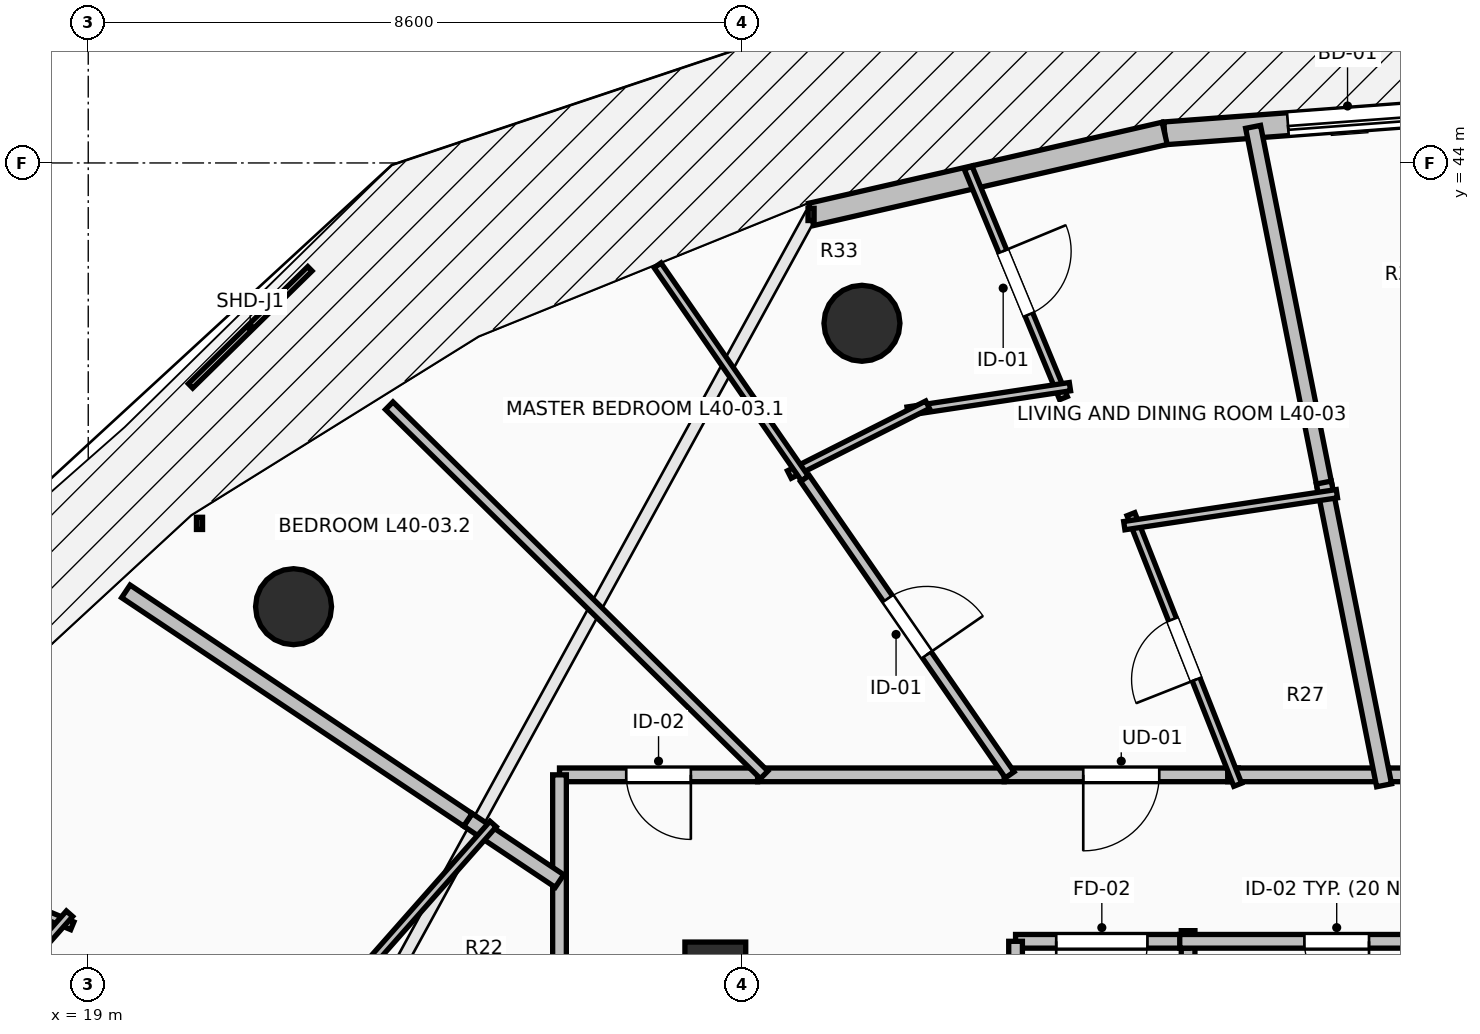
"""IFC4 building model, lengths in metres.
Left out: names, types, materials, properties, quantities, classifications, styles, units other than length and angle.
Written with IfcOpenShell. Run it as: python <this file> out.ifc"""

import sys

from ifc_helpers import new_model, si_unit, direction, frame, frame_2d, origin, origin_2d, place, context, subcontext, project, spatial, rectangle, circle, extrude, element, fill, save


model = new_model("IFC4")
c1 = context("Model", 3, precision=1e-05, world=origin(), true_north=direction((0.0, 1.0)))
c2 = subcontext(c1, "Body", "Model", "MODEL_VIEW")
j1 = project(units=[si_unit("LENGTHUNIT", "METRE"), si_unit("PLANEANGLEUNIT", "RADIAN")], contexts=[c1])
p1 = place(None, origin())
s1 = spatial("IfcSite", under=j1, at=p1, CompositionType="ELEMENT")
p2 = place(p1, origin())
s2 = spatial("IfcBuilding", under=s1, at=p2, CompositionType="ELEMENT")
p3 = place(p2, frame((0.0, 0.0, 150.1)))
s3 = spatial("IfcBuildingStorey", under=s2, at=p3, CompositionType="ELEMENT", Elevation=150.1)
for number, where, z_axis, x_axis in (
    (1, (29.179, 41.891, 0.0), (0.0, 0.0, 1.0), (-0.383, 0.924, 0.0)),
    (2, (21.701, 38.162, 0.0), (0.0, 0.0, 1.0), (-0.707, 0.707, 0.0)),
):
    element("IfcColumn", number, at=place(p3, frame(where, z_axis=z_axis, x_axis=x_axis)), inside=s3, PredefinedType="COLUMN", context=c2, shape_type="SweptSolid", body=[
        extrude(circle(Radius=0.5, at=origin_2d()), origin(), (0.0, 0.0, 1.0), 3.5),
    ])
p4 = place(p3, frame((27.25, 33.15, 0.0), z_axis=(0.0, 0.0, 1.0), x_axis=(1.0, 0.0, 0.0)))
e3 = element("IfcColumn", 3, at=p4, inside=s3, PredefinedType="PILASTER", context=c2, shape_type="SweptSolid", body=[
    extrude(rectangle(XDim=0.8, YDim=1.2, at=origin_2d()), origin(), (0.0, 0.0, 1.0), 3.5),
])
p5 = place(p3, frame((38.0, 44.75, 0.0), z_axis=(0.0, 0.0, 1.0), x_axis=(-0.997237740067, -0.074275768499, 0.0)))
e4 = element("IfcWall", 4, at=p5, inside=s3, PredefinedType="STANDARD", context=c2, shape_type="SweptSolid", body=[
    extrude(rectangle(XDim=4.852, YDim=0.3, at=frame_2d((2.426, 0.0))), origin(), (0.0, 0.0, 1.0), 3.24),
])
p6 = place(p5, frame((1.626, 0.0, 0.0)))
e5 = element("IfcOpeningElement", 5, at=p6, cuts=e4, PredefinedType="OPENING", context=c2, shape_type="SweptSolid", body=[
    extrude(rectangle(XDim=1.6, YDim=2.3, at=frame_2d((0.8, 1.15))), frame((0.0, 0.165, 0.0), z_axis=(0.0, -1.0, 0.0), x_axis=(1.0, 0.0, 0.0)), (0.0, 0.0, 1.0), 0.33),
])
p7 = place(p3, frame((33.162, 44.39, 0.0), z_axis=(0.0, 0.0, 1.0), x_axis=(-0.974698897188, -0.223521944832, 0.0)))
e6 = element("IfcWall", 6, at=p7, inside=s3, PredefinedType="STANDARD", context=c2, shape_type="SweptSolid", body=[
    extrude(rectangle(XDim=4.773, YDim=0.3, at=frame_2d((2.387, 0.0))), origin(), (0.0, 0.0, 1.0), 3.24),
])
p8 = place(p3, frame((33.47, 30.34, 0.0), z_axis=(0.0, 0.0, 1.0), x_axis=(0.0, 1.0, 0.0)))
e7 = element("IfcWall", 7, at=p8, inside=s3, PredefinedType="PARTITIONING", context=c2, shape_type="SweptSolid", body=[
    extrude(rectangle(XDim=3.56, YDim=0.18, at=frame_2d((1.78, 0.0))), origin(), (0.0, 0.0, 1.0), 3.24),
])
p9 = place(p3, frame((33.47, 33.76, 0.0), z_axis=(0.0, 0.0, 1.0), x_axis=(-1.0, 0.0, 0.0)))
e8 = element("IfcWall", 8, at=p9, inside=s3, PredefinedType="PARTITIONING", context=c2, shape_type="SweptSolid", body=[
    extrude(rectangle(XDim=2.27, YDim=0.18, at=frame_2d((1.135, 0.0))), origin(), (0.0, 0.0, 1.0), 3.24),
])
p10 = place(p9, frame((0.535, 0.0, 0.0)))
e9 = element("IfcOpeningElement", 9, at=p10, cuts=e8, PredefinedType="OPENING", context=c2, shape_type="SweptSolid", body=[
    extrude(rectangle(XDim=1.2, YDim=2.15, at=frame_2d((0.6, 1.075))), frame((0.0, 0.105, 0.0), z_axis=(0.0, -1.0, 0.0), x_axis=(1.0, 0.0, 0.0)), (0.0, 0.0, 1.0), 0.21),
])
p11 = place(p3, frame((31.2, 33.76, 0.0), z_axis=(0.0, 0.0, 1.0), x_axis=(0.0, -1.0, 0.0)))
e10 = element("IfcWall", 10, at=p11, inside=s3, PredefinedType="PARTITIONING", context=c2, shape_type="SweptSolid", body=[
    extrude(rectangle(XDim=0.56, YDim=0.18, at=frame_2d((0.28, 0.0))), origin(), (0.0, 0.0, 1.0), 3.24),
])
p12 = place(p3, frame((37.49, 33.76, 0.0), z_axis=(0.0, 0.0, 1.0), x_axis=(-1.0, 0.0, 0.0)))
e11 = element("IfcWall", 11, at=p12, inside=s3, PredefinedType="PARTITIONING", context=c2, shape_type="SweptSolid", body=[
    extrude(rectangle(XDim=4.13, YDim=0.18, at=frame_2d((2.065, 0.0))), origin(), (0.0, 0.0, 1.0), 3.24),
])
p13 = place(p12, frame((1.64, 0.0, 0.0)))
e12 = element("IfcOpeningElement", 12, at=p13, cuts=e11, PredefinedType="OPENING", context=c2, shape_type="SweptSolid", body=[
    extrude(rectangle(XDim=0.85, YDim=2.1, at=frame_2d((0.425, 1.05))), frame((0.0, 0.105, 0.0), z_axis=(0.0, -1.0, 0.0), x_axis=(1.0, 0.0, 0.0)), (0.0, 0.0, 1.0), 0.21),
])
p14 = place(p3, frame((37.862, 35.95, 0.0), z_axis=(0.0, 0.0, 1.0), x_axis=(-1.0, 0.0, 0.0)))
e13 = element("IfcWall", 13, at=p14, inside=s3, PredefinedType="PARTITIONING", context=c2, shape_type="SweptSolid", body=[
    extrude(rectangle(XDim=1.902, YDim=0.18, at=frame_2d((0.951, 0.0))), origin(), (0.0, 0.0, 1.0), 2.886),
])
p15 = place(p14, frame((0.526, 0.0, 0.0)))
e14 = element("IfcOpeningElement", 14, at=p15, cuts=e13, PredefinedType="OPENING", context=c2, shape_type="SweptSolid", body=[
    extrude(rectangle(XDim=0.85, YDim=2.1, at=frame_2d((0.425, 1.05))), frame((0.0, 0.105, 0.0), z_axis=(0.0, -1.0, 0.0), x_axis=(1.0, 0.0, 0.0)), (0.0, 0.0, 1.0), 0.21),
])
p16 = place(p3, frame((34.131, 35.95, 0.0), z_axis=(0.0, 0.0, 1.0), x_axis=(-1.0, 0.0, 0.0)))
e15 = element("IfcWall", 15, at=p16, inside=s3, PredefinedType="PARTITIONING", context=c2, shape_type="SweptSolid", body=[
    extrude(rectangle(XDim=3.081, YDim=0.18, at=frame_2d((1.541, 0.0))), origin(), (0.0, 0.0, 1.0), 2.886),
])
p17 = place(p16, frame((1.041, 0.0, 0.0)))
e16 = element("IfcOpeningElement", 16, at=p17, cuts=e15, PredefinedType="OPENING", context=c2, shape_type="SweptSolid", body=[
    extrude(rectangle(XDim=1.0, YDim=2.15, at=frame_2d((0.5, 1.075))), frame((0.0, 0.105, 0.0), z_axis=(0.0, -1.0, 0.0), x_axis=(1.0, 0.0, 0.0)), (0.0, 0.0, 1.0), 0.21),
])
p18 = place(p3, frame((36.1, 35.95, 0.0), z_axis=(0.0, 0.0, 1.0), x_axis=(-1.0, 0.0, 0.0)))
e17 = element("IfcWall", 17, at=p18, inside=s3, PredefinedType="PARTITIONING", context=c2, shape_type="SweptSolid", body=[
    extrude(rectangle(XDim=2.109, YDim=0.18, at=frame_2d((1.055, 0.0))), origin(), (0.0, 0.0, 1.0), 2.886),
])
p19 = place(p3, frame((31.05, 35.95, 0.0), z_axis=(0.0, 0.0, 1.0), x_axis=(-1.0, 0.0, 0.0)))
e18 = element("IfcWall", 18, at=p19, inside=s3, PredefinedType="PARTITIONING", context=c2, shape_type="SweptSolid", body=[
    extrude(rectangle(XDim=3.244, YDim=0.18, at=frame_2d((1.622, 0.0))), origin(), (0.0, 0.0, 1.0), 2.432),
])
p20 = place(p3, frame((27.806, 35.95, 0.0), z_axis=(0.0, 0.0, 1.0), x_axis=(-1.0, 0.0, 0.0)))
e19 = element("IfcWall", 19, at=p20, inside=s3, PredefinedType="PARTITIONING", context=c2, shape_type="SweptSolid", body=[
    extrude(rectangle(XDim=2.606, YDim=0.18, at=frame_2d((1.303, 0.0))), origin(), (0.0, 0.0, 1.0), 2.432),
])
p21 = place(p20, frame((0.878, 0.0, 0.0)))
e20 = element("IfcOpeningElement", 20, at=p21, cuts=e19, PredefinedType="OPENING", context=c2, shape_type="SweptSolid", body=[
    extrude(rectangle(XDim=0.85, YDim=2.1, at=frame_2d((0.425, 1.05))), frame((0.0, 0.105, 0.0), z_axis=(0.0, -1.0, 0.0), x_axis=(1.0, 0.0, 0.0)), (0.0, 0.0, 1.0), 0.21),
])
p22 = place(p3, frame((25.2, 35.95, 0.0), z_axis=(0.0, 0.0, 1.0), x_axis=(0.0, -1.0, 0.0)))
e21 = element("IfcWall", 21, at=p22, inside=s3, PredefinedType="PARTITIONING", context=c2, shape_type="SweptSolid", body=[
    extrude(rectangle(XDim=1.457, YDim=0.18, at=frame_2d((0.729, 0.0))), origin(), (0.0, 0.0, 1.0), 2.432),
])
p23 = place(p3, frame((25.2, 34.633, 0.0), z_axis=(0.0, 0.0, 1.0), x_axis=(0.0, -1.0, 0.0)))
e22 = element("IfcWall", 22, at=p23, inside=s3, PredefinedType="PARTITIONING", context=c2, shape_type="SweptSolid", body=[
    extrude(rectangle(XDim=3.155, YDim=0.18, at=frame_2d((1.578, 0.0))), origin(), (0.0, 0.0, 1.0), 2.432),
])
p24 = place(p3, frame((34.325, 44.475, 0.0), z_axis=(0.0, 0.0, 1.0), x_axis=(0.195054941626, -0.980792317337, 0.0)))
e23 = element("IfcWall", 23, at=p24, inside=s3, PredefinedType="PARTITIONING", context=c2, shape_type="SweptSolid", body=[
    extrude(rectangle(XDim=4.911, YDim=0.2, at=frame_2d((2.456, 0.0))), origin(), (0.0, 0.0, 1.0), 2.432),
])
p25 = place(p3, frame((35.256, 39.795, 0.0), z_axis=(0.0, 0.0, 1.0), x_axis=(0.195214230991, -0.980760625239, 0.0)))
e24 = element("IfcWall", 24, at=p25, inside=s3, PredefinedType="PARTITIONING", context=c2, shape_type="SweptSolid", body=[
    extrude(rectangle(XDim=4.061, YDim=0.2, at=frame_2d((2.03, 0.0))), origin(), (0.0, 0.0, 1.0), 2.886),
])
p26 = place(p3, frame((34.122, 35.82, 0.0), z_axis=(0.0, 0.0, 1.0), x_axis=(-0.36711859649, 0.930174142896, 0.0)))
e25 = element("IfcWall", 25, at=p26, inside=s3, PredefinedType="PARTITIONING", context=c2, shape_type="SweptSolid", body=[
    extrude(rectangle(XDim=3.826, YDim=0.11, at=frame_2d((1.913, 0.0))), origin(), (0.0, 0.0, 1.0), 2.432),
])
p27 = place(p26, frame((1.488, 0.0, 0.0)))
e26 = element("IfcOpeningElement", 26, at=p27, cuts=e25, PredefinedType="OPENING", context=c2, shape_type="SweptSolid", body=[
    extrude(rectangle(XDim=0.85, YDim=2.1, at=frame_2d((0.425, 1.05))), frame((0.0, 0.07, 0.0), z_axis=(0.0, -1.0, 0.0), x_axis=(1.0, 0.0, 0.0)), (0.0, 0.0, 1.0), 0.14),
])
p28 = place(p3, frame((32.631, 39.228, 0.0), z_axis=(0.0, 0.0, 1.0), x_axis=(0.988890718673, 0.148644362566, 0.0)))
e27 = element("IfcWall", 27, at=p28, inside=s3, PredefinedType="PARTITIONING", context=c2, shape_type="SweptSolid", body=[
    extrude(rectangle(XDim=2.828, YDim=0.11, at=frame_2d((1.414, 0.0))), origin(), (0.0, 0.0, 1.0), 2.432),
])
p29 = place(p3, frame((30.576, 43.938, 0.0), z_axis=(0.0, 0.0, 1.0), x_axis=(0.382336453712, -0.924023179451, 0.0)))
e28 = element("IfcWall", 28, at=p29, inside=s3, PredefinedType="PARTITIONING", context=c2, shape_type="SweptSolid", body=[
    extrude(rectangle(XDim=3.28, YDim=0.11, at=frame_2d((1.64, 0.0))), origin(), (0.0, 0.0, 1.0), 2.728),
])
p30 = place(p29, frame((1.19, 0.0, 0.0)))
e29 = element("IfcOpeningElement", 29, at=p30, cuts=e28, PredefinedType="OPENING", context=c2, shape_type="SweptSolid", body=[
    extrude(rectangle(XDim=0.9, YDim=2.1, at=frame_2d((0.45, 1.05))), frame((0.0, 0.07, 0.0), z_axis=(0.0, -1.0, 0.0), x_axis=(1.0, 0.0, 0.0)), (0.0, 0.0, 1.0), 0.14),
])
p31 = place(p3, frame((31.915, 41.057, 0.0), z_axis=(0.0, 0.0, 1.0), x_axis=(-0.98883996758, -0.148981604626, 0.0)))
e30 = element("IfcWall", 30, at=p31, inside=s3, PredefinedType="PARTITIONING", context=c2, shape_type="SweptSolid", body=[
    extrude(rectangle(XDim=2.16, YDim=0.11, at=frame_2d((1.08, 0.0))), origin(), (0.0, 0.0, 1.0), 3.24),
])
p32 = place(p3, frame((30.043, 40.819, 0.0), z_axis=(0.0, 0.0, 1.0), x_axis=(-0.892695055898, -0.450661222179, 0.0)))
e31 = element("IfcWall", 31, at=p32, inside=s3, PredefinedType="PARTITIONING", context=c2, shape_type="SweptSolid", body=[
    extrude(rectangle(XDim=2.038, YDim=0.11, at=frame_2d((1.019, 0.0))), origin(), (0.0, 0.0, 1.0), 2.432),
])
p33 = place(p3, frame((28.429, 39.849, 0.0), z_axis=(0.0, 0.0, 1.0), x_axis=(-0.568554374161, 0.822645685349, 0.0)))
e32 = element("IfcWall", 32, at=p33, inside=s3, PredefinedType="PARTITIONING", context=c2, shape_type="SweptSolid", body=[
    extrude(rectangle(XDim=3.409, YDim=0.11, at=frame_2d((1.705, 0.0))), origin(), (0.0, 0.0, 1.0), 2.728),
])
p34 = place(p3, frame((28.428, 39.849, 0.0), z_axis=(0.0, 0.0, 1.0), x_axis=(0.568542808453, -0.822653678626, 0.0)))
e33 = element("IfcWall", 33, at=p34, inside=s3, PredefinedType="PARTITIONING", context=c2, shape_type="SweptSolid", body=[
    extrude(rectangle(XDim=4.74, YDim=0.14, at=frame_2d((2.37, 0.0))), origin(), (0.0, 0.0, 1.0), 2.432),
])
p35 = place(p34, frame((1.92, 0.0, 0.0)))
e34 = element("IfcOpeningElement", 34, at=p35, cuts=e33, PredefinedType="OPENING", context=c2, shape_type="SweptSolid", body=[
    extrude(rectangle(XDim=0.9, YDim=2.1, at=frame_2d((0.45, 1.05))), frame((0.0, 0.085, 0.0), z_axis=(0.0, -1.0, 0.0), x_axis=(1.0, 0.0, 0.0)), (0.0, 0.0, 1.0), 0.17),
])
p36 = place(p3, frame((22.96, 40.806, 0.0), z_axis=(0.0, 0.0, 1.0), x_axis=(0.712587980465, -0.70158276069, 0.0)))
e35 = element("IfcWall", 35, at=p36, inside=s3, PredefinedType="PARTITIONING", context=c2, shape_type="SweptSolid", body=[
    extrude(rectangle(XDim=6.921, YDim=0.14, at=frame_2d((3.461, 0.0))), origin(), (0.0, 0.0, 1.0), 2.432),
])
p37 = place(p3, frame((23.995, 35.358, 0.0), z_axis=(0.0, 0.0, 1.0), x_axis=(0.831505536539, -0.555516464837, 0.0)))
e36 = element("IfcWall", 36, at=p37, inside=s3, PredefinedType="PARTITIONING", context=c2, shape_type="SweptSolid", body=[
    extrude(rectangle(XDim=1.449, YDim=0.2, at=frame_2d((0.725, 0.0))), origin(), (0.0, 0.0, 1.0), 3.24),
])
p38 = place(p3, frame((19.495, 38.364, 0.0), z_axis=(0.0, 0.0, 1.0), x_axis=(0.831529389247, -0.55548076008, 0.0)))
e37 = element("IfcWall", 37, at=p38, inside=s3, PredefinedType="PARTITIONING", context=c2, shape_type="SweptSolid", body=[
    extrude(rectangle(XDim=5.412, YDim=0.2, at=frame_2d((2.706, 0.0))), origin(), (0.0, 0.0, 1.0), 2.728),
])
p39 = place(p3, frame((22.081, 32.761, 0.0), z_axis=(0.0, 0.0, 1.0), x_axis=(0.662023888113, 0.749482736004, 0.0)))
e38 = element("IfcWall", 38, at=p39, inside=s3, PredefinedType="PARTITIONING", context=c2, shape_type="SweptSolid", body=[
    extrude(rectangle(XDim=3.392, YDim=0.11, at=frame_2d((1.696, 0.0))), origin(), (0.0, 0.0, 1.0), 3.24),
])
p40 = place(p3, frame((16.231, 35.026, 0.0), z_axis=(0.0, 0.0, 1.0), x_axis=(0.923742873908, -0.383013188943, 0.0)))
e39 = element("IfcWall", 39, at=p40, inside=s3, PredefinedType="PARTITIONING", context=c2, shape_type="SweptSolid", body=[
    extrude(rectangle(XDim=2.771, YDim=0.11, at=frame_2d((1.385, 0.0))), origin(), (0.0, 0.0, 1.0), 2.728),
])
p41 = place(p3, frame((18.754, 34.123, 0.0), z_axis=(0.0, 0.0, 1.0), x_axis=(-0.66207590595, -0.749436785033, 0.0)))
e40 = element("IfcWall", 40, at=p41, inside=s3, PredefinedType="PARTITIONING", context=c2, shape_type="SweptSolid", body=[
    extrude(rectangle(XDim=2.328, YDim=0.11, at=frame_2d((1.164, 0.0))), origin(), (0.0, 0.0, 1.0), 2.432),
])
p42 = place(p6, origin())
e41 = element("IfcDoor", 41, at=p42, inside=s3, OperationType="SLIDING_TO_LEFT", PredefinedType="DOOR", context=c2, shape_type="SweptSolid", body=[
    extrude(rectangle(XDim=1.6, YDim=2.3, at=frame_2d((0.8, 1.15))), frame((0.0, 0.025, 0.0), z_axis=(0.0, -1.0, 0.0), x_axis=(1.0, 0.0, 0.0)), (0.0, 0.0, 1.0), 0.05),
])
fill(e5, e41)
p43 = place(p10, origin())
e42 = element("IfcDoor", 42, at=p43, inside=s3, OperationType="SINGLE_SWING_RIGHT", PredefinedType="DOOR", context=c2, shape_type="SweptSolid", body=[
    extrude(rectangle(XDim=1.2, YDim=2.15, at=frame_2d((0.6, 1.075))), frame((0.0, 0.025, 0.0), z_axis=(0.0, -1.0, 0.0), x_axis=(1.0, 0.0, 0.0)), (0.0, 0.0, 1.0), 0.05),
])
fill(e9, e42)
p44 = place(p13, origin())
e43 = element("IfcDoor", 43, at=p44, inside=s3, OperationType="SINGLE_SWING_LEFT", PredefinedType="DOOR", context=c2, shape_type="SweptSolid", body=[
    extrude(rectangle(XDim=0.85, YDim=2.1, at=frame_2d((0.425, 1.05))), frame((0.0, 0.025, 0.0), z_axis=(0.0, -1.0, 0.0), x_axis=(1.0, 0.0, 0.0)), (0.0, 0.0, 1.0), 0.05),
])
fill(e12, e43)
p45 = place(p17, origin())
e44 = element("IfcDoor", 44, at=p45, inside=s3, OperationType="SINGLE_SWING_RIGHT", PredefinedType="DOOR", context=c2, shape_type="SweptSolid", body=[
    extrude(rectangle(XDim=1.0, YDim=2.15, at=frame_2d((0.5, 1.075))), frame((0.0, 0.025, 0.0), z_axis=(0.0, -1.0, 0.0), x_axis=(1.0, 0.0, 0.0)), (0.0, 0.0, 1.0), 0.05),
])
fill(e16, e44)
p46 = place(p27, origin())
e45 = element("IfcDoor", 45, at=p46, inside=s3, OperationType="SINGLE_SWING_LEFT", PredefinedType="DOOR", context=c2, shape_type="SweptSolid", body=[
    extrude(rectangle(XDim=0.85, YDim=2.1, at=frame_2d((0.425, 1.05))), frame((0.0, 0.025, 0.0), z_axis=(0.0, -1.0, 0.0), x_axis=(1.0, 0.0, 0.0)), (0.0, 0.0, 1.0), 0.05),
])
fill(e26, e45)
p47 = place(p30, origin())
e46 = element("IfcDoor", 46, at=p47, inside=s3, OperationType="SINGLE_SWING_LEFT", PredefinedType="DOOR", context=c2, shape_type="SweptSolid", body=[
    extrude(rectangle(XDim=0.9, YDim=2.1, at=frame_2d((0.45, 1.05))), frame((0.0, 0.025, 0.0), z_axis=(0.0, -1.0, 0.0), x_axis=(1.0, 0.0, 0.0)), (0.0, 0.0, 1.0), 0.05),
])
fill(e29, e46)
p48 = place(p35, origin())
e47 = element("IfcDoor", 47, at=p48, inside=s3, OperationType="SINGLE_SWING_RIGHT", PredefinedType="DOOR", context=c2, shape_type="SweptSolid", body=[
    extrude(rectangle(XDim=0.9, YDim=2.1, at=frame_2d((0.45, 1.05))), frame((0.0, 0.025, 0.0), z_axis=(0.0, -1.0, 0.0), x_axis=(1.0, 0.0, 0.0)), (0.0, 0.0, 1.0), 0.05),
])
fill(e34, e47)
p49 = place(p21, origin())
e48 = element("IfcDoor", 48, at=p49, inside=s3, OperationType="SINGLE_SWING_LEFT", PredefinedType="DOOR", context=c2, shape_type="SweptSolid", body=[
    extrude(rectangle(XDim=0.85, YDim=2.1, at=frame_2d((0.425, 1.05))), frame((0.0, 0.025, 0.0), z_axis=(0.0, -1.0, 0.0), x_axis=(1.0, 0.0, 0.0)), (0.0, 0.0, 1.0), 0.05),
])
fill(e20, e48)
save(model, sys.argv[1])
